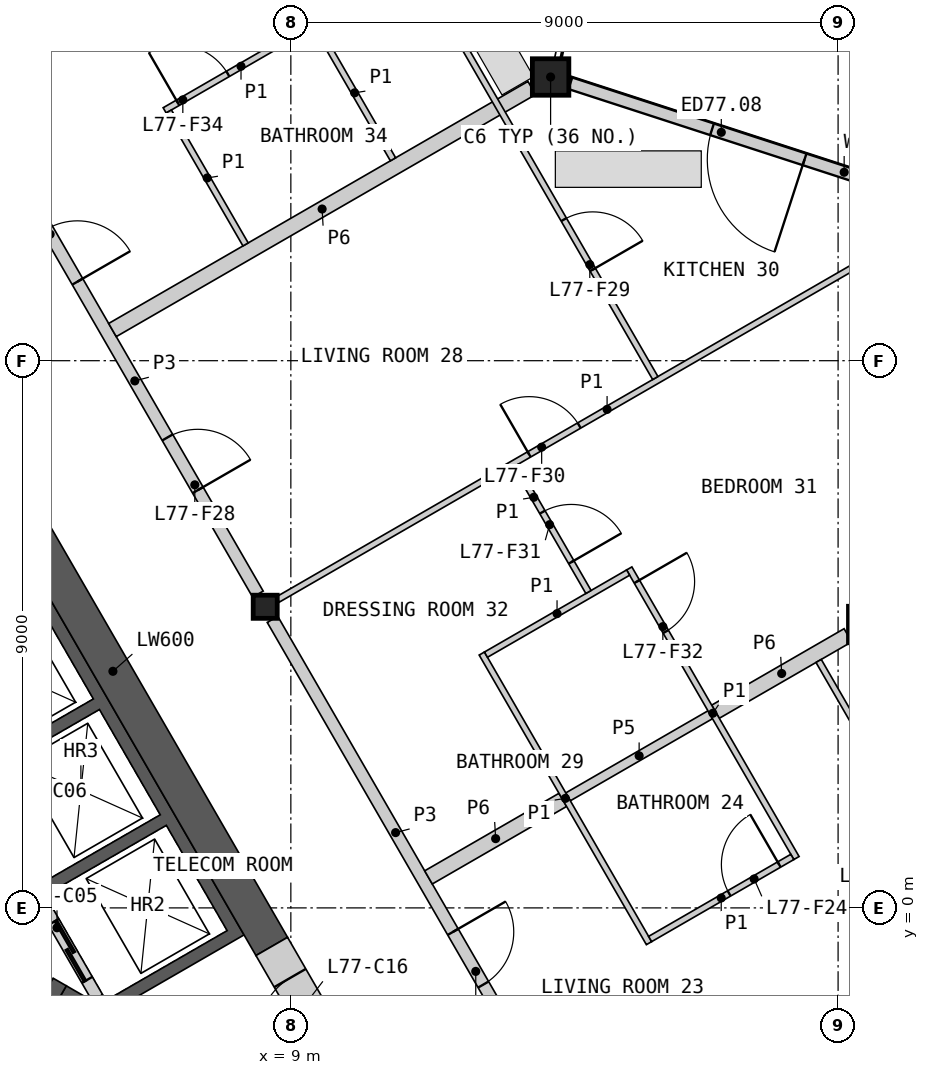
"""IFC4 building model, lengths in metres.
Left out: names, types, materials, properties, quantities, classifications, styles, units other than length and angle.
Written with IfcOpenShell. Run it as: python <this file> out.ifc"""

import sys

from ifc_helpers import new_model, si_unit, direction, frame, frame_2d, origin, origin_2d, place, context, subcontext, project, spatial, polyline, rectangle, hollow_rectangle, i_section, outline, extrude, element, fill, save


model = new_model("IFC4")
c1 = context("Model", 3, precision=1e-05, world=origin(), true_north=direction((0.0, 1.0)))
c2 = subcontext(c1, "Body", "Model", "MODEL_VIEW")
j1 = project(units=[si_unit("LENGTHUNIT", "METRE"), si_unit("PLANEANGLEUNIT", "RADIAN")], contexts=[c1])
p1 = place(None, origin())
s1 = spatial("IfcSite", under=j1, at=p1, CompositionType="ELEMENT")
p2 = place(p1, origin())
s2 = spatial("IfcBuilding", under=s1, at=p2, CompositionType="ELEMENT")
p3 = place(p2, frame((0.0, 0.0, 342.6)))
s3 = spatial("IfcBuildingStorey", under=s2, at=p3, CompositionType="ELEMENT", Elevation=342.6)
for number, where, z_axis, x_axis in (
    (1, (18.471, 4.661, 0.0), (0.0, 0.0, 1.0), (1.0, 0.0, 0.0)),
    (2, (13.272, 13.666, 0.0), (0.0, 0.0, 1.0), (1.0, 0.0, 0.0)),
):
    element("IfcColumn", number, at=place(p3, frame(where, z_axis=z_axis, x_axis=x_axis)), inside=s3, PredefinedType="COLUMN", context=c2, shape_type="SweptSolid", body=[
        extrude(hollow_rectangle(XDim=0.6, YDim=0.6, WallThickness=0.04, at=origin_2d()), origin(), (0.0, 0.0, 1.0), 3.4),
    ])
p4 = place(p3, frame((8.578, 4.953, 0.0), z_axis=(0.0, 0.0, 1.0), x_axis=(1.0, 0.0, 0.0)))
e3 = element("IfcColumn", 3, at=p4, inside=s3, PredefinedType="COLUMN", context=c2, shape_type="SweptSolid", body=[
    extrude(i_section(OverallWidth=0.396, OverallDepth=0.381, WebThickness=0.019, FlangeThickness=0.03, at=origin_2d()), origin(), (0.0, 0.0, 1.0), 3.4),
])
p5 = place(p3, frame((19.601, 11.612, 0.0), z_axis=(0.0, 0.0, 1.0), x_axis=(-0.951065041052, 0.308990756638, 0.0)))
e4 = element("IfcWall", 4, at=p5, inside=s3, PredefinedType="SOLIDWALL", context=c2, shape_type="SweptSolid", body=[
    extrude(rectangle(XDim=6.313, YDim=0.2, at=frame_2d((3.156, 0.0))), origin(), (0.0, 0.0, 1.0), 2.488),
])
p6 = place(p5, frame((2.263, 0.0, 0.0)))
e5 = element("IfcOpeningElement", 5, at=p6, cuts=e4, PredefinedType="OPENING", context=c2, shape_type="SweptSolid", body=[
    extrude(rectangle(XDim=1.6, YDim=2.25, at=frame_2d((0.8, 1.125))), frame((0.0, 0.11, 0.0), z_axis=(0.0, -1.0, 0.0), x_axis=(1.0, 0.0, 0.0)), (0.0, 0.0, 1.0), 0.22),
])
p7 = place(p3, origin())
e6 = element("IfcWall", 6, at=p7, inside=s3, PredefinedType="SHEAR", context=c2, shape_type="SweptSolid", body=[
    extrude(outline(polyline([(1.561, 6.097), (3.731, 7.35), (8.231, -0.444), (6.061, -1.697), (5.96, -1.524), (7.952, -0.374), (6.952, 1.358), (4.96, 0.208), (4.861, 0.381), (6.852, 1.531), (5.852, 3.263), (3.861, 2.113), (3.76, 2.287), (5.752, 3.437), (4.752, 5.169), (2.76, 4.019), (2.66, 4.192), (4.652, 5.342), (3.652, 7.074), (1.66, 5.924), (1.561, 6.097)])), origin(), (0.0, 0.0, 1.0), 3.1),
])
p8 = place(p3, frame((5.817, -1.476, 0.0), z_axis=(0.0, 0.0, 1.0), x_axis=(-0.500002616675, 0.866023893041, 0.0)))
e7 = element("IfcWall", 7, at=p8, inside=s3, PredefinedType="SOLIDWALL", context=c2, shape_type="SweptSolid", body=[
    extrude(rectangle(XDim=8.373, YDim=0.2, at=frame_2d((4.187, 0.0))), origin(), (0.0, 0.0, 1.0), 3.1),
])
p9 = place(p8, frame((0.337, 0.0, 0.0)))
e8 = element("IfcOpeningElement", 8, at=p9, cuts=e7, PredefinedType="OPENING", context=c2, shape_type="SweptSolid", body=[
    extrude(rectangle(XDim=1.1, YDim=2.1, at=frame_2d((0.55, 1.05))), frame((0.0, 0.11, 0.0), z_axis=(0.0, -1.0, 0.0), x_axis=(1.0, 0.0, 0.0)), (0.0, 0.0, 1.0), 0.22),
])
p10 = place(p8, frame((2.537, 0.0, 0.0)))
e9 = element("IfcOpeningElement", 9, at=p10, cuts=e7, PredefinedType="OPENING", context=c2, shape_type="SweptSolid", body=[
    extrude(rectangle(XDim=1.1, YDim=2.1, at=frame_2d((0.55, 1.05))), frame((0.0, 0.11, 0.0), z_axis=(0.0, -1.0, 0.0), x_axis=(1.0, 0.0, 0.0)), (0.0, 0.0, 1.0), 0.22),
])
p11 = place(p8, frame((4.737, 0.0, 0.0)))
e10 = element("IfcOpeningElement", 10, at=p11, cuts=e7, PredefinedType="OPENING", context=c2, shape_type="SweptSolid", body=[
    extrude(rectangle(XDim=1.1, YDim=2.1, at=frame_2d((0.55, 1.05))), frame((0.0, 0.11, 0.0), z_axis=(0.0, -1.0, 0.0), x_axis=(1.0, 0.0, 0.0)), (0.0, 0.0, 1.0), 0.22),
])
p12 = place(p8, frame((7.037, 0.0, 0.0)))
e11 = element("IfcOpeningElement", 11, at=p12, cuts=e7, PredefinedType="OPENING", context=c2, shape_type="SweptSolid", body=[
    extrude(rectangle(XDim=0.9, YDim=2.1, at=frame_2d((0.45, 1.05))), frame((0.0, 0.11, 0.0), z_axis=(0.0, -1.0, 0.0), x_axis=(1.0, 0.0, 0.0)), (0.0, 0.0, 1.0), 0.22),
])
p13 = place(p3, origin())
e12 = element("IfcWall", 12, at=p13, inside=s3, PredefinedType="SHEAR", context=c2, shape_type="SweptSolid", body=[
    extrude(outline(polyline([(10.032, -4.298), (10.374, -4.206), (5.307, -1.281), (5.182, -1.498), (10.032, -4.298)])), origin(), (0.0, 0.0, 1.0), 3.1),
])
p14 = place(p3, frame((3.655, -3.893, 0.0), z_axis=(0.0, 0.0, 1.0), x_axis=(0.499982516597, 0.866035497597, 0.0)))
e13 = element("IfcWall", 13, at=p14, inside=s3, PredefinedType="SHEAR", context=c2, shape_type="SweptSolid", body=[
    extrude(rectangle(XDim=3.088, YDim=0.25, at=frame_2d((1.544, 0.0))), origin(), (0.0, 0.0, 1.0), 3.1),
])
p15 = place(p14, frame((0.994, 0.0, 0.0)))
e14 = element("IfcOpeningElement", 14, at=p15, cuts=e13, PredefinedType="OPENING", context=c2, shape_type="SweptSolid", body=[
    extrude(rectangle(XDim=1.1, YDim=2.1, at=frame_2d((0.55, 1.05))), frame((0.0, 0.135, 0.0), z_axis=(0.0, -1.0, 0.0), x_axis=(1.0, 0.0, 0.0)), (0.0, 0.0, 1.0), 0.27),
])
p16 = place(p3, frame((8.686, -0.634, 0.0), z_axis=(0.0, 0.0, 1.0), x_axis=(-0.50001836461, 0.866014800712, 0.0)))
e15 = element("IfcWall", 15, at=p16, inside=s3, PredefinedType="SHEAR", context=c2, shape_type="SweptSolid", body=[
    extrude(rectangle(XDim=10.451, YDim=0.6, at=frame_2d((5.225, 0.0))), origin(), (0.0, 0.0, 1.0), 3.1),
])
p17 = place(p3, frame((9.786, -2.539, 0.0), z_axis=(0.0, 0.0, 1.0), x_axis=(-0.499981787252, 0.866035918664, 0.0)))
e16 = element("IfcWall", 16, at=p17, inside=s3, PredefinedType="SHEAR", context=c2, shape_type="SweptSolid", body=[
    extrude(rectangle(XDim=2.2, YDim=0.6, at=frame_2d((1.1, 0.0))), origin(), (0.0, 0.0, 1.0), 3.1),
])
p18 = place(p17, frame((0.6, 0.0, 0.0)))
e17 = element("IfcOpeningElement", 17, at=p18, cuts=e16, PredefinedType="OPENING", context=c2, shape_type="SweptSolid", body=[
    extrude(rectangle(XDim=1.0, YDim=2.1, at=frame_2d((0.5, 1.05))), frame((0.0, 0.31, 0.0), z_axis=(0.0, -1.0, 0.0), x_axis=(1.0, 0.0, 0.0)), (0.0, 0.0, 1.0), 0.62),
])
p19 = place(p3, frame((4.409, 12.174, 0.0), z_axis=(0.0, 0.0, 1.0), x_axis=(0.499984266882, -0.866034487114, 0.0)))
e18 = element("IfcWall", 18, at=p19, inside=s3, PredefinedType="PARTITIONING", context=c2, shape_type="SweptSolid", body=[
    extrude(rectangle(XDim=8.099, YDim=0.2, at=frame_2d((4.049, 0.0))), origin(), (0.0, 0.0, 1.0), 3.1),
])
p20 = place(p19, frame((5.123, 0.0, 0.0)))
e19 = element("IfcOpeningElement", 19, at=p20, cuts=e18, PredefinedType="OPENING", context=c2, shape_type="SweptSolid", body=[
    extrude(rectangle(XDim=1.0, YDim=2.1, at=frame_2d((0.5, 1.05))), frame((0.0, 0.11, 0.0), z_axis=(0.0, -1.0, 0.0), x_axis=(1.0, 0.0, 0.0)), (0.0, 0.0, 1.0), 0.22),
])
p21 = place(p19, frame((1.164, 0.0, 0.0)))
e20 = element("IfcOpeningElement", 20, at=p21, cuts=e18, PredefinedType="OPENING", context=c2, shape_type="SweptSolid", body=[
    extrude(rectangle(XDim=1.0, YDim=2.1, at=frame_2d((0.5, 1.05))), frame((0.0, 0.11, 0.0), z_axis=(0.0, -1.0, 0.0), x_axis=(1.0, 0.0, 0.0)), (0.0, 0.0, 1.0), 0.22),
])
p22 = place(p3, frame((8.698, 4.745, 0.0), z_axis=(0.0, 0.0, 1.0), x_axis=(0.499984266882, -0.866034487114, 0.0)))
e21 = element("IfcWall", 21, at=p22, inside=s3, PredefinedType="PARTITIONING", context=c2, shape_type="SweptSolid", body=[
    extrude(rectangle(XDim=8.099, YDim=0.2, at=frame_2d((4.049, 0.0))), origin(), (0.0, 0.0, 1.0), 3.1),
])
p23 = place(p22, frame((5.935, 0.0, 0.0)))
e22 = element("IfcOpeningElement", 22, at=p23, cuts=e21, PredefinedType="OPENING", context=c2, shape_type="SweptSolid", body=[
    extrude(rectangle(XDim=1.0, YDim=2.1, at=frame_2d((0.5, 1.05))), frame((0.0, 0.11, 0.0), z_axis=(0.0, -1.0, 0.0), x_axis=(1.0, 0.0, 0.0)), (0.0, 0.0, 1.0), 0.22),
])
p24 = place(p3, frame((6.066, 9.504, 0.0), z_axis=(0.0, 0.0, 1.0), x_axis=(0.866021168401, 0.500007335828, 0.0)))
e23 = element("IfcWall", 23, at=p24, inside=s3, PredefinedType="PARTITIONING", context=c2, shape_type="SweptSolid", body=[
    extrude(rectangle(XDim=7.962, YDim=0.25, at=frame_2d((3.981, 0.0))), origin(), (0.0, 0.0, 1.0), 2.33),
])
p25 = place(p3, frame((11.264, 0.502, 0.0), z_axis=(0.0, 0.0, 1.0), x_axis=(0.866030925526, 0.499990435942, 0.0)))
e24 = element("IfcWall", 24, at=p25, inside=s3, PredefinedType="PARTITIONING", context=c2, shape_type="SweptSolid", body=[
    extrude(rectangle(XDim=2.55, YDim=0.25, at=frame_2d((1.275, 0.0))), origin(), (0.0, 0.0, 1.0), 2.33),
])
p26 = place(p3, frame((15.984, 3.227, 0.0), z_axis=(0.0, 0.0, 1.0), x_axis=(0.8660174017, 0.500013859761, 0.0)))
e25 = element("IfcWall", 25, at=p26, inside=s3, PredefinedType="PARTITIONING", context=c2, shape_type="SweptSolid", body=[
    extrude(rectangle(XDim=2.514, YDim=0.25, at=frame_2d((1.257, 0.0))), origin(), (0.0, 0.0, 1.0), 2.33),
])
p27 = place(p3, frame((13.559, 1.827, 0.0), z_axis=(0.0, 0.0, 1.0), x_axis=(0.866059108428, 0.4999416173, 0.0)))
e26 = element("IfcWall", 26, at=p27, inside=s3, PredefinedType="PLUMBINGWALL", context=c2, shape_type="SweptSolid", body=[
    extrude(rectangle(XDim=2.7, YDim=0.15, at=frame_2d((1.35, 0.0))), origin(), (0.0, 0.0, 1.0), 2.33),
])
p28 = place(p3, frame((13.863, -4.0, 0.0), z_axis=(0.0, 0.0, 1.0), x_axis=(0.866033203648, 0.499986489997, 0.0)))
e27 = element("IfcWall", 27, at=p28, inside=s3, PredefinedType="PARTITIONING", context=c2, shape_type="SweptSolid", body=[
    extrude(rectangle(XDim=12.646, YDim=0.1, at=frame_2d((6.323, 0.0))), origin(), (0.0, 0.0, 1.0), 2.33),
])
p29 = place(p28, frame((8.319, 0.0, 0.0)))
e28 = element("IfcOpeningElement", 28, at=p29, cuts=e27, PredefinedType="OPENING", context=c2, shape_type="SweptSolid", body=[
    extrude(rectangle(XDim=0.95, YDim=2.1, at=frame_2d((0.475, 1.05))), frame((0.0, 0.06, 0.0), z_axis=(0.0, -1.0, 0.0), x_axis=(1.0, 0.0, 0.0)), (0.0, 0.0, 1.0), 0.12),
])
p30 = place(p3, frame((3.468, 14.005, 0.0), z_axis=(0.0, 0.0, 1.0), x_axis=(0.866020616849, 0.500008291124, 0.0)))
e29 = element("IfcWall", 29, at=p30, inside=s3, PredefinedType="PARTITIONING", context=c2, shape_type="SweptSolid", body=[
    extrude(rectangle(XDim=12.643, YDim=0.1, at=frame_2d((6.321, 0.0))), origin(), (0.0, 0.0, 1.0), 2.33),
])
p31 = place(p30, frame((8.115, 0.0, 0.0)))
e30 = element("IfcOpeningElement", 30, at=p31, cuts=e29, PredefinedType="OPENING", context=c2, shape_type="SweptSolid", body=[
    extrude(rectangle(XDim=0.95, YDim=2.1, at=frame_2d((0.475, 1.05))), frame((0.0, 0.06, 0.0), z_axis=(0.0, -1.0, 0.0), x_axis=(1.0, 0.0, 0.0)), (0.0, 0.0, 1.0), 0.12),
])
p32 = place(p3, frame((8.786, 5.073, 0.0), z_axis=(0.0, 0.0, 1.0), x_axis=(0.86602139559, 0.500006942333, 0.0)))
e31 = element("IfcWall", 31, at=p32, inside=s3, PredefinedType="PARTITIONING", context=c2, shape_type="SweptSolid", body=[
    extrude(rectangle(XDim=12.505, YDim=0.1, at=frame_2d((6.252, 0.0))), origin(), (0.0, 0.0, 1.0), 2.33),
])
p33 = place(p32, frame((4.772, 0.0, 0.0)))
e32 = element("IfcOpeningElement", 32, at=p33, cuts=e31, PredefinedType="OPENING", context=c2, shape_type="SweptSolid", body=[
    extrude(rectangle(XDim=0.95, YDim=2.1, at=frame_2d((0.475, 1.05))), frame((0.0, 0.06, 0.0), z_axis=(0.0, -1.0, 0.0), x_axis=(1.0, 0.0, 0.0)), (0.0, 0.0, 1.0), 0.12),
])
p34 = place(p3, frame((9.846, 17.63, 0.0), z_axis=(0.0, 0.0, 1.0), x_axis=(0.500013259472, -0.866017748289, 0.0)))
e33 = element("IfcWall", 33, at=p34, inside=s3, PredefinedType="PARTITIONING", context=c2, shape_type="SweptSolid", body=[
    extrude(rectangle(XDim=10.295, YDim=0.1, at=frame_2d((5.147, 0.0))), origin(), (0.0, 0.0, 1.0), 2.33),
])
p35 = place(p34, frame((7.286, 0.0, 0.0)))
e34 = element("IfcOpeningElement", 34, at=p35, cuts=e33, PredefinedType="OPENING", context=c2, shape_type="SweptSolid", body=[
    extrude(rectangle(XDim=0.95, YDim=2.1, at=frame_2d((0.475, 1.05))), frame((0.0, 0.06, 0.0), z_axis=(0.0, -1.0, 0.0), x_axis=(1.0, 0.0, 0.0)), (0.0, 0.0, 1.0), 0.12),
])
p36 = place(p34, frame((0.954, 0.0, 0.0)))
e35 = element("IfcOpeningElement", 35, at=p36, cuts=e33, PredefinedType="OPENING", context=c2, shape_type="SweptSolid", body=[
    extrude(rectangle(XDim=0.95, YDim=2.1, at=frame_2d((0.475, 1.05))), frame((0.0, 0.06, 0.0), z_axis=(0.0, -1.0, 0.0), x_axis=(1.0, 0.0, 0.0)), (0.0, 0.0, 1.0), 0.12),
])
p37 = place(p3, frame((14.565, 5.583, 0.0), z_axis=(0.0, 0.0, 1.0), x_axis=(0.499996545922, -0.866027397988, 0.0)))
e36 = element("IfcWall", 36, at=p37, inside=s3, PredefinedType="PARTITIONING", context=c2, shape_type="SweptSolid", body=[
    extrude(rectangle(XDim=5.5, YDim=0.1, at=frame_2d((2.75, 0.0))), origin(), (0.0, 0.0, 1.0), 2.33),
])
p38 = place(p37, frame((0.25, 0.0, 0.0)))
e37 = element("IfcOpeningElement", 37, at=p38, cuts=e36, PredefinedType="OPENING", context=c2, shape_type="SweptSolid", body=[
    extrude(rectangle(XDim=0.95, YDim=2.1, at=frame_2d((0.475, 1.05))), frame((0.0, 0.06, 0.0), z_axis=(0.0, -1.0, 0.0), x_axis=(1.0, 0.0, 0.0)), (0.0, 0.0, 1.0), 0.12),
])
p39 = place(p3, frame((12.14, 4.183, 0.0), z_axis=(0.0, 0.0, 1.0), x_axis=(0.499996545922, -0.866027397988, 0.0)))
e38 = element("IfcWall", 38, at=p39, inside=s3, PredefinedType="PARTITIONING", context=c2, shape_type="SweptSolid", body=[
    extrude(rectangle(XDim=5.5, YDim=0.1, at=frame_2d((2.75, 0.0))), origin(), (0.0, 0.0, 1.0), 2.33),
])
p40 = place(p3, frame((17.68, 4.062, 0.0), z_axis=(0.0, 0.0, 1.0), x_axis=(0.499997360652, -0.866026927608, 0.0)))
e39 = element("IfcWall", 39, at=p40, inside=s3, PredefinedType="PARTITIONING", context=c2, shape_type="SweptSolid", body=[
    extrude(rectangle(XDim=5.022, YDim=0.1, at=frame_2d((2.511, 0.0))), origin(), (0.0, 0.0, 1.0), 2.33),
])
p41 = place(p40, frame((3.108, 0.0, 0.0)))
e40 = element("IfcOpeningElement", 40, at=p41, cuts=e39, PredefinedType="OPENING", context=c2, shape_type="SweptSolid", body=[
    extrude(rectangle(XDim=0.95, YDim=2.1, at=frame_2d((0.475, 1.05))), frame((0.0, 0.06, 0.0), z_axis=(0.0, -1.0, 0.0), x_axis=(1.0, 0.0, 0.0)), (0.0, 0.0, 1.0), 0.12),
])
p42 = place(p3, frame((6.925, 13.117, 0.0), z_axis=(0.0, 0.0, 1.0), x_axis=(0.866011727401, 0.500023687443, 0.0)))
e41 = element("IfcWall", 41, at=p42, inside=s3, PredefinedType="PARTITIONING", context=c2, shape_type="SweptSolid", body=[
    extrude(rectangle(XDim=2.9, YDim=0.1, at=frame_2d((1.45, 0.0))), origin(), (0.0, 0.0, 1.0), 2.33),
])
p43 = place(p42, frame((0.25, 0.0, 0.0)))
e42 = element("IfcOpeningElement", 42, at=p43, cuts=e41, PredefinedType="OPENING", context=c2, shape_type="SweptSolid", body=[
    extrude(rectangle(XDim=0.95, YDim=2.1, at=frame_2d((0.475, 1.05))), frame((0.0, 0.06, 0.0), z_axis=(0.0, -1.0, 0.0), x_axis=(1.0, 0.0, 0.0)), (0.0, 0.0, 1.0), 0.12),
])
p44 = place(p3, frame((14.909, -0.512, 0.0), z_axis=(0.0, 0.0, 1.0), x_axis=(0.866019956843, 0.50000943426, 0.0)))
e43 = element("IfcWall", 43, at=p44, inside=s3, PredefinedType="PARTITIONING", context=c2, shape_type="SweptSolid", body=[
    extrude(rectangle(XDim=2.7, YDim=0.1, at=frame_2d((1.35, 0.0))), origin(), (0.0, 0.0, 1.0), 2.33),
])
p45 = place(p44, frame((1.5, 0.0, 0.0)))
e44 = element("IfcOpeningElement", 44, at=p45, cuts=e43, PredefinedType="OPENING", context=c2, shape_type="SweptSolid", body=[
    extrude(rectangle(XDim=0.95, YDim=2.1, at=frame_2d((0.475, 1.05))), frame((0.0, 0.06, 0.0), z_axis=(0.0, -1.0, 0.0), x_axis=(1.0, 0.0, 0.0)), (0.0, 0.0, 1.0), 0.12),
])
p46 = place(p3, frame((12.209, 4.165, 0.0), z_axis=(0.0, 0.0, 1.0), x_axis=(0.866019956843, 0.50000943426, 0.0)))
e45 = element("IfcWall", 45, at=p46, inside=s3, PredefinedType="PARTITIONING", context=c2, shape_type="SweptSolid", body=[
    extrude(rectangle(XDim=2.7, YDim=0.1, at=frame_2d((1.35, 0.0))), origin(), (0.0, 0.0, 1.0), 2.33),
])
p47 = place(p3, frame((9.418, 14.499, 0.0), z_axis=(0.0, 0.0, 1.0), x_axis=(0.500090717682, -0.865973021571, 0.0)))
e46 = element("IfcWall", 46, at=p47, inside=s3, PredefinedType="PARTITIONING", context=c2, shape_type="SweptSolid", body=[
    extrude(rectangle(XDim=2.525, YDim=0.1, at=frame_2d((1.262, 0.0))), origin(), (0.0, 0.0, 1.0), 2.33),
])
p48 = place(p3, frame((6.993, 13.099, 0.0), z_axis=(0.0, 0.0, 1.0), x_axis=(0.500048846702, -0.865997200291, 0.0)))
e47 = element("IfcWall", 47, at=p48, inside=s3, PredefinedType="PARTITIONING", context=c2, shape_type="SweptSolid", body=[
    extrude(rectangle(XDim=2.525, YDim=0.1, at=frame_2d((1.263, 0.0))), origin(), (0.0, 0.0, 1.0), 2.33),
])
p49 = place(p3, frame((12.696, 7.272, 0.0), z_axis=(0.0, 0.0, 1.0), x_axis=(0.500016292001, -0.866015997389, 0.0)))
e48 = element("IfcWall", 48, at=p49, inside=s3, PredefinedType="PARTITIONING", context=c2, shape_type="SweptSolid", body=[
    extrude(rectangle(XDim=2.397, YDim=0.1, at=frame_2d((1.199, 0.0))), origin(), (0.0, 0.0, 1.0), 2.33),
])
p50 = place(p49, frame((0.882, 0.0, 0.0)))
e49 = element("IfcOpeningElement", 49, at=p50, cuts=e48, PredefinedType="OPENING", context=c2, shape_type="SweptSolid", body=[
    extrude(rectangle(XDim=0.95, YDim=2.1, at=frame_2d((0.475, 1.05))), frame((0.0, 0.06, 0.0), z_axis=(0.0, -1.0, 0.0), x_axis=(1.0, 0.0, 0.0)), (0.0, 0.0, 1.0), 0.12),
])
p51 = place(p6, origin())
e50 = element("IfcDoor", 50, at=p51, inside=s3, OperationType="DOUBLE_DOOR_SINGLE_SWING", PredefinedType="DOOR", context=c2, shape_type="SweptSolid", body=[
    extrude(rectangle(XDim=1.6, YDim=2.25, at=frame_2d((0.8, 1.125))), frame((0.0, 0.025, 0.0), z_axis=(0.0, -1.0, 0.0), x_axis=(1.0, 0.0, 0.0)), (0.0, 0.0, 1.0), 0.05),
])
fill(e5, e50)
p52 = place(p9, origin())
e51 = element("IfcDoor", 51, at=p52, inside=s3, OperationType="SLIDING_TO_LEFT", PredefinedType="DOOR", context=c2, shape_type="SweptSolid", body=[
    extrude(rectangle(XDim=1.1, YDim=2.1, at=frame_2d((0.55, 1.05))), frame((0.0, 0.025, 0.0), z_axis=(0.0, -1.0, 0.0), x_axis=(1.0, 0.0, 0.0)), (0.0, 0.0, 1.0), 0.05),
])
fill(e8, e51)
p53 = place(p18, origin())
e52 = element("IfcDoor", 52, at=p53, inside=s3, OperationType="SINGLE_SWING_LEFT", PredefinedType="DOOR", context=c2, shape_type="SweptSolid", body=[
    extrude(rectangle(XDim=1.0, YDim=2.1, at=frame_2d((0.5, 1.05))), frame((0.0, 0.055, 0.0), z_axis=(0.0, -1.0, 0.0), x_axis=(1.0, 0.0, 0.0)), (0.0, 0.0, 1.0), 0.05),
])
fill(e17, e52)
p54 = place(p23, origin())
e53 = element("IfcDoor", 53, at=p54, inside=s3, OperationType="SINGLE_SWING_LEFT", PredefinedType="DOOR", context=c2, shape_type="SweptSolid", body=[
    extrude(rectangle(XDim=1.0, YDim=2.1, at=frame_2d((0.5, 1.05))), frame((0.0, 0.025, 0.0), z_axis=(0.0, -1.0, 0.0), x_axis=(1.0, 0.0, 0.0)), (0.0, 0.0, 1.0), 0.05),
])
fill(e22, e53)
p55 = place(p45, origin())
e54 = element("IfcDoor", 54, at=p55, inside=s3, OperationType="SINGLE_SWING_RIGHT", PredefinedType="DOOR", context=c2, shape_type="SweptSolid", body=[
    extrude(rectangle(XDim=0.95, YDim=2.1, at=frame_2d((0.475, 1.05))), frame((0.0, 0.025, 0.0), z_axis=(0.0, -1.0, 0.0), x_axis=(1.0, 0.0, 0.0)), (0.0, 0.0, 1.0), 0.05),
])
fill(e44, e54)
p56 = place(p20, origin())
e55 = element("IfcDoor", 55, at=p56, inside=s3, OperationType="SINGLE_SWING_RIGHT", PredefinedType="DOOR", context=c2, shape_type="SweptSolid", body=[
    extrude(rectangle(XDim=1.0, YDim=2.1, at=frame_2d((0.5, 1.05))), frame((0.0, 0.025, 0.0), z_axis=(0.0, -1.0, 0.0), x_axis=(1.0, 0.0, 0.0)), (0.0, 0.0, 1.0), 0.05),
])
fill(e19, e55)
p57 = place(p35, origin())
e56 = element("IfcDoor", 56, at=p57, inside=s3, OperationType="SINGLE_SWING_RIGHT", PredefinedType="DOOR", context=c2, shape_type="SweptSolid", body=[
    extrude(rectangle(XDim=0.95, YDim=2.1, at=frame_2d((0.475, 1.05))), frame((0.0, 0.025, 0.0), z_axis=(0.0, -1.0, 0.0), x_axis=(1.0, 0.0, 0.0)), (0.0, 0.0, 1.0), 0.05),
])
fill(e34, e56)
p58 = place(p33, origin())
e57 = element("IfcDoor", 57, at=p58, inside=s3, OperationType="SINGLE_SWING_LEFT", PredefinedType="DOOR", context=c2, shape_type="SweptSolid", body=[
    extrude(rectangle(XDim=0.95, YDim=2.1, at=frame_2d((0.475, 1.05))), frame((0.0, 0.025, 0.0), z_axis=(0.0, -1.0, 0.0), x_axis=(1.0, 0.0, 0.0)), (0.0, 0.0, 1.0), 0.05),
])
fill(e32, e57)
p59 = place(p50, origin())
e58 = element("IfcDoor", 58, at=p59, inside=s3, OperationType="SINGLE_SWING_RIGHT", PredefinedType="DOOR", context=c2, shape_type="SweptSolid", body=[
    extrude(rectangle(XDim=0.95, YDim=2.1, at=frame_2d((0.475, 1.05))), frame((0.0, 0.025, 0.0), z_axis=(0.0, -1.0, 0.0), x_axis=(1.0, 0.0, 0.0)), (0.0, 0.0, 1.0), 0.05),
])
fill(e49, e58)
p60 = place(p38, origin())
e59 = element("IfcDoor", 59, at=p60, inside=s3, OperationType="SINGLE_SWING_LEFT", PredefinedType="DOOR", context=c2, shape_type="SweptSolid", body=[
    extrude(rectangle(XDim=0.95, YDim=2.1, at=frame_2d((0.475, 1.05))), frame((0.0, 0.025, 0.0), z_axis=(0.0, -1.0, 0.0), x_axis=(1.0, 0.0, 0.0)), (0.0, 0.0, 1.0), 0.05),
])
fill(e37, e59)
p61 = place(p21, origin())
e60 = element("IfcDoor", 60, at=p61, inside=s3, OperationType="SINGLE_SWING_RIGHT", PredefinedType="DOOR", context=c2, shape_type="SweptSolid", body=[
    extrude(rectangle(XDim=1.0, YDim=2.1, at=frame_2d((0.5, 1.05))), frame((0.0, 0.025, 0.0), z_axis=(0.0, -1.0, 0.0), x_axis=(1.0, 0.0, 0.0)), (0.0, 0.0, 1.0), 0.05),
])
fill(e20, e60)
p62 = place(p43, origin())
e61 = element("IfcDoor", 61, at=p62, inside=s3, OperationType="SINGLE_SWING_LEFT", PredefinedType="DOOR", context=c2, shape_type="SweptSolid", body=[
    extrude(rectangle(XDim=0.95, YDim=2.1, at=frame_2d((0.475, 1.05))), frame((0.0, 0.025, 0.0), z_axis=(0.0, -1.0, 0.0), x_axis=(1.0, 0.0, 0.0)), (0.0, 0.0, 1.0), 0.05),
])
fill(e42, e61)
save(model, sys.argv[1])
